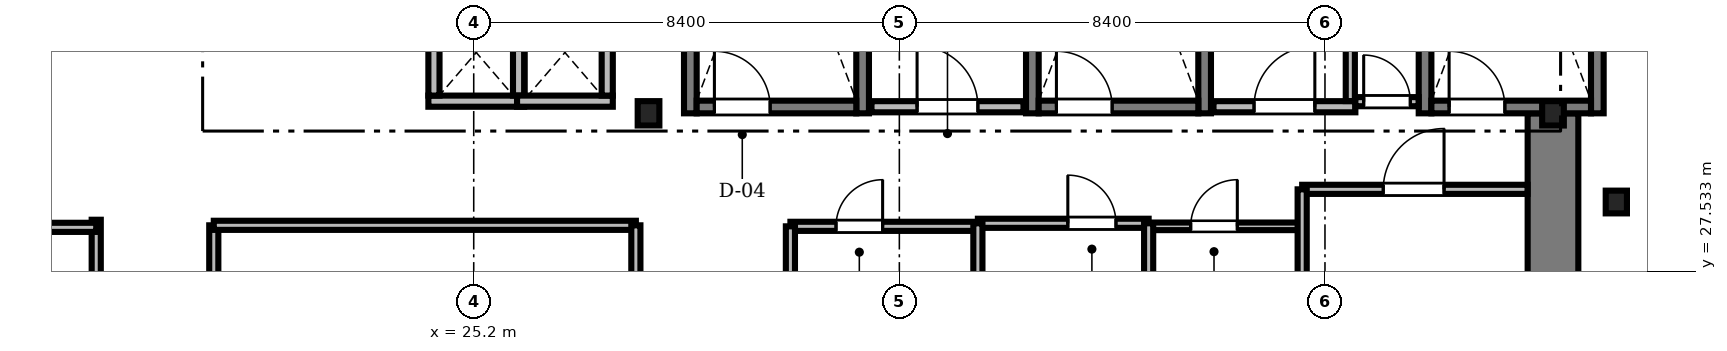
"""IFC4 building model, lengths in metres.
Left out: names, types, materials, properties, quantities, classifications, styles, units other than length and angle.
Written with IfcOpenShell. Run it as: python <this file> out.ifc"""

import sys

from ifc_helpers import new_model, si_unit, direction, frame, frame_2d, origin, origin_2d, place, context, subcontext, project, spatial, rectangle, i_section, extrude, source, transform, mapped, element, fill, save


model = new_model("IFC4")
c1 = context("Model", 3, precision=1e-05, world=origin(), true_north=direction((0.0, 1.0)))
c2 = subcontext(c1, "Body", "Model", "MODEL_VIEW")
j1 = project(units=[si_unit("LENGTHUNIT", "METRE"), si_unit("PLANEANGLEUNIT", "RADIAN")], contexts=[c1])
p1 = place(None, origin())
s1 = spatial("IfcSite", under=j1, at=p1, CompositionType="ELEMENT")
p2 = place(p1, origin())
s2 = spatial("IfcBuilding", under=s1, at=p2, CompositionType="ELEMENT")
p3 = place(p2, frame((0.0, 0.0, 34.9)))
s3 = spatial("IfcBuildingStorey", under=s2, at=p3, CompositionType="ELEMENT", Elevation=34.9)
m1 = source(origin(), c2, "Body", "SweptSolid", [
    extrude(rectangle(XDim=13.15, YDim=1.0, at=frame_2d((6.575, 0.0))), origin(), (0.0, 0.0, 1.0), 3.41),
])
p4 = place(p3, frame((46.5, 17.5, 0.0), z_axis=(0.0, 0.0, 1.0), x_axis=(0.0, 1.0, 0.0)))
e1 = element("IfcWall", 1, at=p4, inside=s3, PredefinedType="SHEAR", context=c2, shape_type="MappedRepresentation", body=[
    mapped(m1, transform((0.0, 0.0, 0.0), scale=1.0)),
])
m2 = source(origin(), c2, "Body", "SweptSolid", [
    extrude(i_section(OverallWidth=0.428, OverallDepth=0.481, WebThickness=0.04, FlangeThickness=0.063, FilletRadius=0.015, at=origin_2d()), origin(), (0.0, 0.0, 1.0), 3.41),
])
for number, where, z_axis, x_axis in (
    (2, (28.65, 30.65, 0.0), (0.0, 0.0, 1.0), (1.0, 0.0, 0.0)),
    (3, (46.5, 30.65, 0.0), (0.0, 0.0, 1.0), (1.0, 0.0, 0.0)),
):
    element("IfcColumn", number, at=place(p3, frame(where, z_axis=z_axis, x_axis=x_axis)), inside=s3, PredefinedType="COLUMN", context=c2, shape_type="MappedRepresentation", body=[
        mapped(m2, transform((0.0, 0.0, 0.0), scale=1.0)),
    ])
m3 = source(origin(), c2, "Body", "SweptSolid", [
    extrude(i_section(OverallWidth=0.419, OverallDepth=0.449, WebThickness=0.031, FlangeThickness=0.048, FilletRadius=0.015, at=origin_2d()), origin(), (0.0, 0.0, 1.0), 3.41),
])
p5 = place(p3, frame((47.75, 28.9, 0.0), z_axis=(0.0, 0.0, 1.0), x_axis=(1.0, 0.0, 0.0)))
e4 = element("IfcColumn", 4, at=p5, inside=s3, PredefinedType="COLUMN", context=c2, shape_type="MappedRepresentation", body=[
    mapped(m3, transform((0.0, 0.0, 0.0), scale=1.0)),
])
m4 = source(origin(), c2, "Body", "SweptSolid", [
    extrude(rectangle(XDim=9.15, YDim=0.25, at=frame_2d((4.575, 0.0))), origin(), (0.0, 0.0, 1.0), 3.45),
])
for number, where, z_axis, x_axis in (
    (5, (29.475, 30.65, 0.0), (0.0, 0.0, 1.0), (0.0, 1.0, 0.0)),
    (6, (32.875, 30.65, 0.0), (0.0, 0.0, 1.0), (0.0, 1.0, 0.0)),
):
    element("IfcWall", number, at=place(p3, frame(where, z_axis=z_axis, x_axis=x_axis)), inside=s3, PredefinedType="SOLIDWALL", context=c2, shape_type="MappedRepresentation", body=[
        mapped(m4, transform((0.0, 0.0, 0.0), scale=1.0)),
    ])
m5 = source(origin(), c2, "Body", "SweptSolid", [
    extrude(rectangle(XDim=3.15, YDim=0.25, at=frame_2d((1.575, 0.0))), origin(), (0.0, 0.0, 1.0), 3.45),
])
p6 = place(p3, frame((29.6, 30.775, 0.0), z_axis=(0.0, 0.0, 1.0), x_axis=(1.0, 0.0, 0.0)))
e7 = element("IfcWall", 7, at=p6, inside=s3, PredefinedType="SOLIDWALL", context=c2, shape_type="MappedRepresentation", body=[
    mapped(m5, transform((0.0, 0.0, 0.0), scale=1.0)),
])
m6 = source(origin(), c2, "Body", "SweptSolid", [
    extrude(rectangle(XDim=1.1, YDim=2.2, at=frame_2d((0.55, 1.1))), frame((0.0, 0.135, 0.0), z_axis=(0.0, -1.0, 0.0), x_axis=(1.0, 0.0, 0.0)), (0.0, 0.0, 1.0), 0.27),
])
p7 = place(p6, frame((0.35, 0.0, 0.0)))
e8 = element("IfcOpeningElement", 8, at=p7, cuts=e7, PredefinedType="OPENING", context=c2, shape_type="MappedRepresentation", body=[
    mapped(m6, transform((0.0, 0.0, 0.0), scale=1.0)),
])
for number, where, z_axis, x_axis in (
    (9, (36.225, 30.65, 0.0), (0.0, 0.0, 1.0), (0.0, 1.0, 0.0)),
    (10, (39.625, 30.65, 0.0), (0.0, 0.0, 1.0), (0.0, 1.0, 0.0)),
):
    element("IfcWall", number, at=place(p3, frame(where, z_axis=z_axis, x_axis=x_axis)), inside=s3, PredefinedType="SOLIDWALL", context=c2, shape_type="MappedRepresentation", body=[
        mapped(m4, transform((0.0, 0.0, 0.0), scale=1.0)),
    ])
p8 = place(p3, frame((36.35, 30.775, 0.0), z_axis=(0.0, 0.0, 1.0), x_axis=(1.0, 0.0, 0.0)))
e11 = element("IfcWall", 11, at=p8, inside=s3, PredefinedType="SOLIDWALL", context=c2, shape_type="MappedRepresentation", body=[
    mapped(m5, transform((0.0, 0.0, 0.0), scale=1.0)),
])
p9 = place(p8, frame((0.35, 0.0, 0.0)))
e12 = element("IfcOpeningElement", 12, at=p9, cuts=e11, PredefinedType="OPENING", context=c2, shape_type="MappedRepresentation", body=[
    mapped(m6, transform((0.0, 0.0, 0.0), scale=1.0)),
])
for number, where, z_axis, x_axis in (
    (13, (43.975, 30.65, 0.0), (0.0, 0.0, 1.0), (0.0, 1.0, 0.0)),
    (14, (47.375, 30.65, 0.0), (0.0, 0.0, 1.0), (0.0, 1.0, 0.0)),
):
    element("IfcWall", number, at=place(p3, frame(where, z_axis=z_axis, x_axis=x_axis)), inside=s3, PredefinedType="SOLIDWALL", context=c2, shape_type="MappedRepresentation", body=[
        mapped(m4, transform((0.0, 0.0, 0.0), scale=1.0)),
    ])
p10 = place(p3, frame((44.1, 30.775, 0.0), z_axis=(0.0, 0.0, 1.0), x_axis=(1.0, 0.0, 0.0)))
e15 = element("IfcWall", 15, at=p10, inside=s3, PredefinedType="SOLIDWALL", context=c2, shape_type="MappedRepresentation", body=[
    mapped(m5, transform((0.0, 0.0, 0.0), scale=1.0)),
])
p11 = place(p10, frame((0.35, 0.0, 0.0)))
e16 = element("IfcOpeningElement", 16, at=p11, cuts=e15, PredefinedType="OPENING", context=c2, shape_type="MappedRepresentation", body=[
    mapped(m6, transform((0.0, 0.0, 0.0), scale=1.0)),
])
m7 = source(origin(), c2, "Body", "SweptSolid", [
    extrude(rectangle(XDim=3.0, YDim=0.22, at=frame_2d((1.5, 0.0))), origin(), (0.0, 0.0, 1.0), 3.41),
])
p12 = place(p3, frame((33.05, 30.78, 0.0), z_axis=(0.0, 0.0, 1.0), x_axis=(1.0, 0.0, 0.0)))
e17 = element("IfcWall", 17, at=p12, inside=s3, PredefinedType="SOLIDWALL", context=c2, shape_type="MappedRepresentation", body=[
    mapped(m7, transform((0.0, 0.0, 0.0), scale=1.0)),
])
m8 = source(origin(), c2, "Body", "SweptSolid", [
    extrude(rectangle(XDim=1.2, YDim=2.2, at=frame_2d((0.6, 1.1))), frame((0.0, 0.12, 0.0), z_axis=(0.0, -1.0, 0.0), x_axis=(1.0, 0.0, 0.0)), (0.0, 0.0, 1.0), 0.24),
])
p13 = place(p12, frame((0.9, 0.0, 0.0)))
e18 = element("IfcOpeningElement", 18, at=p13, cuts=e17, PredefinedType="OPENING", context=c2, shape_type="MappedRepresentation", body=[
    mapped(m8, transform((0.0, 0.0, 0.0), scale=1.0)),
])
m9 = source(origin(), c2, "Body", "SweptSolid", [
    extrude(rectangle(XDim=2.8, YDim=0.22, at=frame_2d((1.4, 0.0))), origin(), (0.0, 0.0, 1.0), 3.41),
])
p14 = place(p3, frame((39.8, 30.78, 0.0), z_axis=(0.0, 0.0, 1.0), x_axis=(1.0, 0.0, 0.0)))
e19 = element("IfcWall", 19, at=p14, inside=s3, PredefinedType="SOLIDWALL", context=c2, shape_type="MappedRepresentation", body=[
    mapped(m9, transform((0.0, 0.0, 0.0), scale=1.0)),
])
p15 = place(p14, frame((0.8, 0.0, 0.0)))
e20 = element("IfcOpeningElement", 20, at=p15, cuts=e19, PredefinedType="OPENING", context=c2, shape_type="MappedRepresentation", body=[
    mapped(m8, transform((0.0, 0.0, 0.0), scale=1.0)),
])
m10 = source(origin(), c2, "Body", "SweptSolid", [
    extrude(rectangle(XDim=1.89, YDim=0.22, at=frame_2d((0.945, 0.0))), origin(), (0.0, 0.0, 1.0), 3.41),
])
p16 = place(p3, frame((24.305, 30.89, 0.0), z_axis=(0.0, 0.0, 1.0), x_axis=(1.0, 0.0, 0.0)))
e21 = element("IfcWall", 21, at=p16, inside=s3, PredefinedType="SOLIDWALL", context=c2, shape_type="MappedRepresentation", body=[
    mapped(m10, transform((0.0, 0.0, 0.0), scale=1.0)),
])
m11 = source(origin(), c2, "Body", "SweptSolid", [
    extrude(rectangle(XDim=1.7, YDim=0.22, at=frame_2d((0.85, 0.0))), origin(), (0.0, 0.0, 1.0), 3.41),
])
for number, where, z_axis, x_axis in (
    (22, (24.415, 31.0, 0.0), (0.0, 0.0, 1.0), (0.0, 1.0, 0.0)),
    (23, (26.085, 31.0, 0.0), (0.0, 0.0, 1.0), (0.0, 1.0, 0.0)),
):
    element("IfcWall", number, at=place(p3, frame(where, z_axis=z_axis, x_axis=x_axis)), inside=s3, PredefinedType="SOLIDWALL", context=c2, shape_type="MappedRepresentation", body=[
        mapped(m11, transform((0.0, 0.0, 0.0), scale=1.0)),
    ])
p17 = place(p3, frame((26.055, 30.89, 0.0), z_axis=(0.0, 0.0, 1.0), x_axis=(1.0, 0.0, 0.0)))
e24 = element("IfcWall", 24, at=p17, inside=s3, PredefinedType="SOLIDWALL", context=c2, shape_type="MappedRepresentation", body=[
    mapped(m10, transform((0.0, 0.0, 0.0), scale=1.0)),
])
p18 = place(p3, frame((27.835, 31.0, 0.0), z_axis=(0.0, 0.0, 1.0), x_axis=(0.0, 1.0, 0.0)))
e25 = element("IfcWall", 25, at=p18, inside=s3, PredefinedType="SOLIDWALL", context=c2, shape_type="MappedRepresentation", body=[
    mapped(m11, transform((0.0, 0.0, 0.0), scale=1.0)),
])
m12 = source(origin(), c2, "Body", "SweptSolid", [
    extrude(rectangle(XDim=13.89, YDim=0.18, at=frame_2d((6.945, 0.0))), origin(), (0.0, 0.0, 1.0), 2.802),
])
p19 = place(p3, frame((17.75, 14.66, 0.0), z_axis=(0.0, 0.0, 1.0), x_axis=(0.0, 1.0, 0.0)))
e26 = element("IfcWall", 26, at=p19, inside=s3, PredefinedType="PARTITIONING", context=c2, shape_type="MappedRepresentation", body=[
    mapped(m12, transform((0.0, 0.0, 0.0), scale=1.0)),
])
m13 = source(origin(), c2, "Body", "SweptSolid", [
    extrude(rectangle(XDim=1.05, YDim=2.2, at=frame_2d((0.525, 1.1))), frame((0.0, 0.1, 0.0), z_axis=(0.0, -1.0, 0.0), x_axis=(1.0, 0.0, 0.0)), (0.0, 0.0, 1.0), 0.2),
])
p20 = place(p19, frame((1.77, 0.0, 0.0)))
e27 = element("IfcOpeningElement", 27, at=p20, cuts=e26, PredefinedType="OPENING", context=c2, shape_type="MappedRepresentation", body=[
    mapped(m13, transform((0.0, 0.0, 0.0), scale=1.0)),
])
m14 = source(origin(), c2, "Body", "SweptSolid", [
    extrude(rectangle(XDim=0.95, YDim=2.15, at=frame_2d((0.475, 1.075))), frame((0.0, 0.1, 0.0), z_axis=(0.0, -1.0, 0.0), x_axis=(1.0, 0.0, 0.0)), (0.0, 0.0, 1.0), 0.2),
])
p21 = place(p19, frame((7.575, 0.0, 0.0)))
e28 = element("IfcOpeningElement", 28, at=p21, cuts=e26, PredefinedType="OPENING", context=c2, shape_type="MappedRepresentation", body=[
    mapped(m14, transform((0.0, 0.0, 0.0), scale=1.0)),
])
p22 = place(p19, frame((10.93, 0.0, 0.0)))
e29 = element("IfcOpeningElement", 29, at=p22, cuts=e26, PredefinedType="OPENING", context=c2, shape_type="MappedRepresentation", body=[
    mapped(m13, transform((0.0, 0.0, 0.0), scale=1.0)),
])
m15 = source(origin(), c2, "Body", "SweptSolid", [
    extrude(rectangle(XDim=4.448, YDim=0.18, at=frame_2d((2.224, 0.0))), origin(), (0.0, 0.0, 1.0), 3.042),
])
p23 = place(p3, frame((41.55, 29.15, 0.0), z_axis=(0.0, 0.0, 1.0), x_axis=(1.0, 0.0, 0.0)))
e30 = element("IfcWall", 30, at=p23, inside=s3, PredefinedType="PARTITIONING", context=c2, shape_type="MappedRepresentation", body=[
    mapped(m15, transform((0.0, 0.0, 0.0), scale=1.0)),
])
m16 = source(origin(), c2, "Body", "SweptSolid", [
    extrude(rectangle(XDim=1.2, YDim=2.2, at=frame_2d((0.6, 1.1))), frame((0.0, 0.1, 0.0), z_axis=(0.0, -1.0, 0.0), x_axis=(1.0, 0.0, 0.0)), (0.0, 0.0, 1.0), 0.2),
])
p24 = place(p23, frame((1.6, 0.0, 0.0)))
e31 = element("IfcOpeningElement", 31, at=p24, cuts=e30, PredefinedType="OPENING", context=c2, shape_type="MappedRepresentation", body=[
    mapped(m16, transform((0.0, 0.0, 0.0), scale=1.0)),
])
m17 = source(origin(), c2, "Body", "SweptSolid", [
    extrude(rectangle(XDim=4.24, YDim=0.18, at=frame_2d((2.12, 0.0))), origin(), (0.0, 0.0, 1.0), 2.802),
])
p25 = place(p3, frame((20.07, 24.2, 0.0), z_axis=(0.0, 0.0, 1.0), x_axis=(0.0, 1.0, 0.0)))
e32 = element("IfcWall", 32, at=p25, inside=s3, PredefinedType="PARTITIONING", context=c2, shape_type="MappedRepresentation", body=[
    mapped(m17, transform((0.0, 0.0, 0.0), scale=1.0)),
])
p26 = place(p25, frame((1.4, 0.0, 0.0)))
e33 = element("IfcOpeningElement", 33, at=p26, cuts=e32, PredefinedType="OPENING", context=c2, shape_type="MappedRepresentation", body=[
    mapped(m13, transform((0.0, 0.0, 0.0), scale=1.0)),
])
m18 = source(origin(), c2, "Body", "SweptSolid", [
    extrude(rectangle(XDim=3.7, YDim=0.18, at=frame_2d((1.85, 0.0))), origin(), (0.0, 0.0, 1.0), 3.042),
])
p27 = place(p3, frame((31.45, 28.42, 0.0), z_axis=(0.0, 0.0, 1.0), x_axis=(1.0, 0.0, 0.0)))
e34 = element("IfcWall", 34, at=p27, inside=s3, PredefinedType="PARTITIONING", context=c2, shape_type="MappedRepresentation", body=[
    mapped(m18, transform((0.0, 0.0, 0.0), scale=1.0)),
])
m19 = source(origin(), c2, "Body", "SweptSolid", [
    extrude(rectangle(XDim=0.92, YDim=2.1, at=frame_2d((0.46, 1.05))), frame((0.0, 0.1, 0.0), z_axis=(0.0, -1.0, 0.0), x_axis=(1.0, 0.0, 0.0)), (0.0, 0.0, 1.0), 0.2),
])
p28 = place(p27, frame((0.9, 0.0, 0.0)))
e35 = element("IfcOpeningElement", 35, at=p28, cuts=e34, PredefinedType="OPENING", context=c2, shape_type="MappedRepresentation", body=[
    mapped(m19, transform((0.0, 0.0, 0.0), scale=1.0)),
])
m20 = source(origin(), c2, "Body", "SweptSolid", [
    extrude(rectangle(XDim=3.37, YDim=0.18, at=frame_2d((1.685, 0.0))), origin(), (0.0, 0.0, 1.0), 3.41),
])
p29 = place(p3, frame((35.15, 28.48, 0.0), z_axis=(0.0, 0.0, 1.0), x_axis=(1.0, 0.0, 0.0)))
e36 = element("IfcWall", 36, at=p29, inside=s3, PredefinedType="PARTITIONING", context=c2, shape_type="MappedRepresentation", body=[
    mapped(m20, transform((0.0, 0.0, 0.0), scale=1.0)),
])
p30 = place(p29, frame((1.775, 0.0, 0.0)))
e37 = element("IfcOpeningElement", 37, at=p30, cuts=e36, PredefinedType="OPENING", context=c2, shape_type="MappedRepresentation", body=[
    mapped(m14, transform((0.0, 0.0, 0.0), scale=1.0)),
])
m21 = source(origin(), c2, "Body", "SweptSolid", [
    extrude(rectangle(XDim=3.0, YDim=0.15, at=frame_2d((1.5, 0.0))), origin(), (0.0, 0.0, 1.0), 3.41),
])
p31 = place(p3, frame((38.52, 28.42, 0.0), z_axis=(0.0, 0.0, 1.0), x_axis=(1.0, 0.0, 0.0)))
e38 = element("IfcWall", 38, at=p31, inside=s3, PredefinedType="PARTITIONING", context=c2, shape_type="MappedRepresentation", body=[
    mapped(m21, transform((0.0, 0.0, 0.0), scale=1.0)),
])
m22 = source(origin(), c2, "Body", "SweptSolid", [
    extrude(rectangle(XDim=0.92, YDim=2.1, at=frame_2d((0.46, 1.05))), frame((0.0, 0.085, 0.0), z_axis=(0.0, -1.0, 0.0), x_axis=(1.0, 0.0, 0.0)), (0.0, 0.0, 1.0), 0.17),
])
p32 = place(p31, frame((0.83, 0.0, 0.0)))
e39 = element("IfcOpeningElement", 39, at=p32, cuts=e38, PredefinedType="OPENING", context=c2, shape_type="MappedRepresentation", body=[
    mapped(m22, transform((0.0, 0.0, 0.0), scale=1.0)),
])
m23 = source(origin(), c2, "Body", "SweptSolid", [
    extrude(rectangle(XDim=1.248, YDim=0.18, at=frame_2d((0.624, 0.0))), origin(), (0.0, 0.0, 1.0), 3.41),
])
p33 = place(p3, frame((42.6, 30.88, 0.0), z_axis=(0.0, 0.0, 1.0), x_axis=(1.0, 0.0, 0.0)))
e40 = element("IfcWall", 40, at=p33, inside=s3, PredefinedType="PARTITIONING", context=c2, shape_type="MappedRepresentation", body=[
    mapped(m23, transform((0.0, 0.0, 0.0), scale=1.0)),
])
p34 = place(p33, frame((0.164, 0.0, 0.0)))
e41 = element("IfcOpeningElement", 41, at=p34, cuts=e40, PredefinedType="OPENING", context=c2, shape_type="MappedRepresentation", body=[
    mapped(m19, transform((0.0, 0.0, 0.0), scale=1.0)),
])
m24 = source(origin(), c2, "Body", "SweptSolid", [
    extrude(rectangle(XDim=15.52, YDim=0.18, at=frame_2d((7.76, 0.0))), origin(), (0.0, 0.0, 1.0), 2.652),
])
p35 = place(p3, frame((2.23, 28.4, 0.0), z_axis=(0.0, 0.0, 1.0), x_axis=(1.0, 0.0, 0.0)))
e42 = element("IfcWall", 42, at=p35, inside=s3, PredefinedType="PARTITIONING", context=c2, shape_type="MappedRepresentation", body=[
    mapped(m24, transform((0.0, 0.0, 0.0), scale=1.0)),
])
m25 = source(origin(), c2, "Body", "SweptSolid", [
    extrude(rectangle(XDim=8.33, YDim=0.18, at=frame_2d((4.165, 0.0))), origin(), (0.0, 0.0, 1.0), 3.41),
])
p36 = place(p3, frame((20.07, 28.44, 0.0), z_axis=(0.0, 0.0, 1.0), x_axis=(1.0, 0.0, 0.0)))
e43 = element("IfcWall", 43, at=p36, inside=s3, PredefinedType="PARTITIONING", context=c2, shape_type="MappedRepresentation", body=[
    mapped(m25, transform((0.0, 0.0, 0.0), scale=1.0)),
])
p37 = place(p3, frame((28.4, 24.2, 0.0), z_axis=(0.0, 0.0, 1.0), x_axis=(0.0, 1.0, 0.0)))
e44 = element("IfcWall", 44, at=p37, inside=s3, PredefinedType="PARTITIONING", context=c2, shape_type="MappedRepresentation", body=[
    mapped(m17, transform((0.0, 0.0, 0.0), scale=1.0)),
])
m26 = source(origin(), c2, "Body", "SweptSolid", [
    extrude(rectangle(XDim=2.35, YDim=0.18, at=frame_2d((1.175, 0.0))), origin(), (0.0, 0.0, 1.0), 2.802),
])
p38 = place(p3, frame((41.55, 26.8, 0.0), z_axis=(0.0, 0.0, 1.0), x_axis=(0.0, 1.0, 0.0)))
e45 = element("IfcWall", 45, at=p38, inside=s3, PredefinedType="PARTITIONING", context=c2, shape_type="MappedRepresentation", body=[
    mapped(m26, transform((0.0, 0.0, 0.0), scale=1.0)),
])
m27 = source(origin(), c2, "Body", "SweptSolid", [
    extrude(rectangle(XDim=1.858, YDim=0.18, at=frame_2d((0.929, 0.0))), origin(), (0.0, 0.0, 1.0), 3.41),
])
p39 = place(p3, frame((42.5, 30.892, 0.0), z_axis=(0.0, 0.0, 1.0), x_axis=(0.0, 1.0, 0.0)))
e46 = element("IfcWall", 46, at=p39, inside=s3, PredefinedType="PARTITIONING", context=c2, shape_type="MappedRepresentation", body=[
    mapped(m27, transform((0.0, 0.0, 0.0), scale=1.0)),
])
m28 = source(origin(), c2, "Body", "SweptSolid", [
    extrude(rectangle(XDim=1.66, YDim=0.18, at=frame_2d((0.83, 0.0))), origin(), (0.0, 0.0, 1.0), 2.952),
])
for number, where, z_axis, x_axis in (
    (47, (35.15, 26.82, 0.0), (0.0, 0.0, 1.0), (0.0, 1.0, 0.0)),
    (48, (38.52, 26.82, 0.0), (0.0, 0.0, 1.0), (0.0, 1.0, 0.0)),
):
    element("IfcWall", number, at=place(p3, frame(where, z_axis=z_axis, x_axis=x_axis)), inside=s3, PredefinedType="PARTITIONING", context=c2, shape_type="MappedRepresentation", body=[
        mapped(m28, transform((0.0, 0.0, 0.0), scale=1.0)),
    ])
m29 = source(origin(), c2, "Body", "SweptSolid", [
    extrude(rectangle(XDim=1.6, YDim=0.18, at=frame_2d((0.8, 0.0))), origin(), (0.0, 0.0, 1.0), 2.952),
])
p40 = place(p3, frame((31.45, 26.82, 0.0), z_axis=(0.0, 0.0, 1.0), x_axis=(0.0, 1.0, 0.0)))
e49 = element("IfcWall", 49, at=p40, inside=s3, PredefinedType="PARTITIONING", context=c2, shape_type="MappedRepresentation", body=[
    mapped(m29, transform((0.0, 0.0, 0.0), scale=1.0)),
])
m30 = source(origin(), c2, "Body", "SweptSolid", [
    extrude(rectangle(XDim=1.1, YDim=2.2, at=frame_2d((0.55, 1.1))), frame((0.0, 0.025, 0.0), z_axis=(0.0, -1.0, 0.0), x_axis=(1.0, 0.0, 0.0)), (0.0, 0.0, 1.0), 0.05),
])
p41 = place(p7, origin())
e50 = element("IfcDoor", 50, at=p41, inside=s3, OperationType="SINGLE_SWING_LEFT", PredefinedType="DOOR", context=c2, shape_type="MappedRepresentation", body=[
    mapped(m30, transform((0.0, 0.0, 0.0), scale=1.0)),
])
fill(e8, e50)
p42 = place(p9, origin())
e51 = element("IfcDoor", 51, at=p42, inside=s3, OperationType="SINGLE_SWING_LEFT", PredefinedType="DOOR", context=c2, shape_type="MappedRepresentation", body=[
    mapped(m30, transform((0.0, 0.0, 0.0), scale=1.0)),
])
fill(e12, e51)
p43 = place(p11, origin())
e52 = element("IfcDoor", 52, at=p43, inside=s3, OperationType="SINGLE_SWING_LEFT", PredefinedType="DOOR", context=c2, shape_type="MappedRepresentation", body=[
    mapped(m30, transform((0.0, 0.0, 0.0), scale=1.0)),
])
fill(e16, e52)
m31 = source(origin(), c2, "Body", "SweptSolid", [
    extrude(rectangle(XDim=1.2, YDim=2.2, at=frame_2d((0.6, 1.1))), frame((0.0, 0.025, 0.0), z_axis=(0.0, -1.0, 0.0), x_axis=(1.0, 0.0, 0.0)), (0.0, 0.0, 1.0), 0.05),
])
p44 = place(p13, origin())
e53 = element("IfcDoor", 53, at=p44, inside=s3, OperationType="SINGLE_SWING_LEFT", PredefinedType="DOOR", context=c2, shape_type="MappedRepresentation", body=[
    mapped(m31, transform((0.0, 0.0, 0.0), scale=1.0)),
])
fill(e18, e53)
p45 = place(p15, origin())
e54 = element("IfcDoor", 54, at=p45, inside=s3, OperationType="SINGLE_SWING_RIGHT", PredefinedType="DOOR", context=c2, shape_type="MappedRepresentation", body=[
    mapped(m31, transform((0.0, 0.0, 0.0), scale=1.0)),
])
fill(e20, e54)
p46 = place(p24, origin())
e55 = element("IfcDoor", 55, at=p46, inside=s3, OperationType="SINGLE_SWING_RIGHT", PredefinedType="DOOR", context=c2, shape_type="MappedRepresentation", body=[
    mapped(m31, transform((0.0, 0.0, 0.0), scale=1.0)),
])
fill(e31, e55)
m32 = source(origin(), c2, "Body", "SweptSolid", [
    extrude(rectangle(XDim=0.92, YDim=2.1, at=frame_2d((0.46, 1.05))), frame((0.0, 0.025, 0.0), z_axis=(0.0, -1.0, 0.0), x_axis=(1.0, 0.0, 0.0)), (0.0, 0.0, 1.0), 0.05),
])
p47 = place(p28, origin())
e56 = element("IfcDoor", 56, at=p47, inside=s3, OperationType="SINGLE_SWING_RIGHT", PredefinedType="DOOR", context=c2, shape_type="MappedRepresentation", body=[
    mapped(m32, transform((0.0, 0.0, 0.0), scale=1.0)),
])
fill(e35, e56)
m33 = source(origin(), c2, "Body", "SweptSolid", [
    extrude(rectangle(XDim=0.95, YDim=2.15, at=frame_2d((0.475, 1.075))), frame((0.0, 0.025, 0.0), z_axis=(0.0, -1.0, 0.0), x_axis=(1.0, 0.0, 0.0)), (0.0, 0.0, 1.0), 0.05),
])
p48 = place(p30, origin())
e57 = element("IfcDoor", 57, at=p48, inside=s3, OperationType="SINGLE_SWING_LEFT", PredefinedType="DOOR", context=c2, shape_type="MappedRepresentation", body=[
    mapped(m33, transform((0.0, 0.0, 0.0), scale=1.0)),
])
fill(e37, e57)
p49 = place(p32, origin())
e58 = element("IfcDoor", 58, at=p49, inside=s3, OperationType="SINGLE_SWING_RIGHT", PredefinedType="DOOR", context=c2, shape_type="MappedRepresentation", body=[
    mapped(m32, transform((0.0, 0.0, 0.0), scale=1.0)),
])
fill(e39, e58)
p50 = place(p34, origin())
e59 = element("IfcDoor", 59, at=p50, inside=s3, OperationType="SINGLE_SWING_LEFT", PredefinedType="DOOR", context=c2, shape_type="MappedRepresentation", body=[
    mapped(m32, transform((0.0, 0.0, 0.0), scale=1.0)),
])
fill(e41, e59)
save(model, sys.argv[1])
